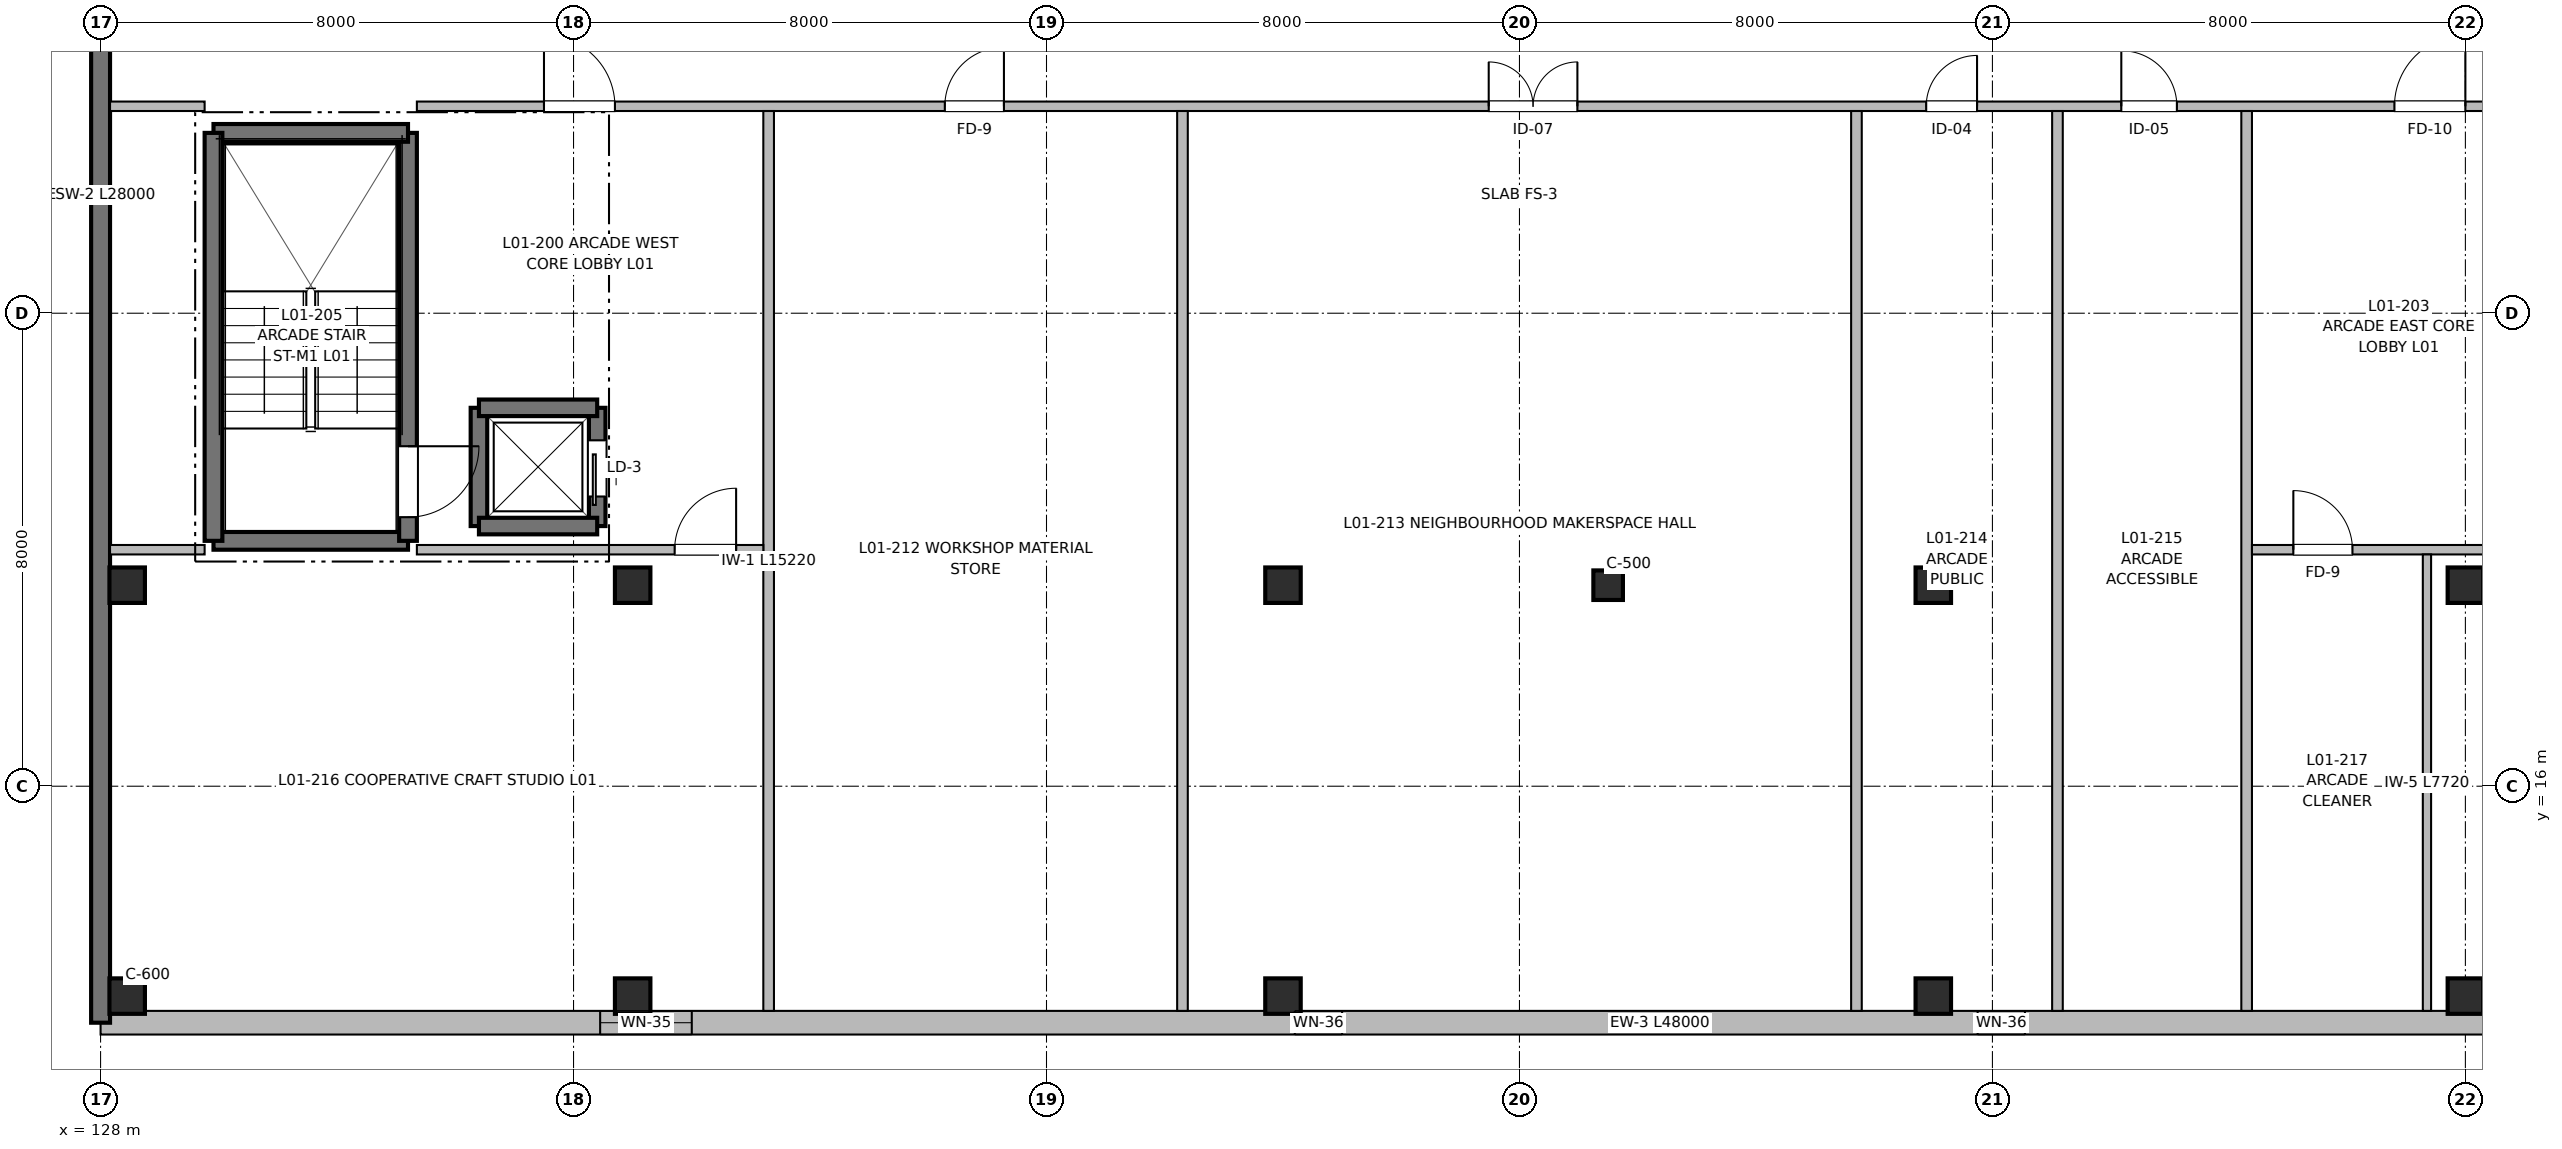
"""IFC4 building model, lengths in metres.
Left out: names, types, materials, properties, quantities, classifications, styles, units other than length and angle.
Written with IfcOpenShell. Run it as: python <this file> out.ifc"""

import sys

from ifc_helpers import new_model, si_unit, direction, frame, frame_2d, origin, origin_2d, place, context, subcontext, project, spatial, rectangle, extrude, element, fill, save


model = new_model("IFC4")
c1 = context("Model", 3, precision=1e-05, world=origin(), true_north=direction((0.0, 1.0)))
c2 = subcontext(c1, "Body", "Model", "MODEL_VIEW")
j1 = project(units=[si_unit("LENGTHUNIT", "METRE"), si_unit("PLANEANGLEUNIT", "RADIAN")], contexts=[c1])
p1 = place(None, origin())
s1 = spatial("IfcSite", under=j1, at=p1, CompositionType="ELEMENT")
p2 = place(p1, origin())
s2 = spatial("IfcBuilding", under=s1, at=p2, CompositionType="ELEMENT")
p3 = place(p2, frame((0.0, 0.0, 4.16)))
s3 = spatial("IfcBuildingStorey", under=s2, at=p3, CompositionType="ELEMENT", Elevation=4.16)
for number, where, z_axis, x_axis in (
    (1, (128.45, 12.45, 0.0), (0.0, 0.0, 1.0), (1.0, 0.0, 0.0)),
    (2, (128.45, 19.4, 0.0), (0.0, 0.0, 1.0), (1.0, 0.0, 0.0)),
    (3, (137.0, 12.45, 0.0), (0.0, 0.0, 1.0), (1.0, 0.0, 0.0)),
    (4, (137.0, 19.4, 0.0), (0.0, 0.0, 1.0), (1.0, 0.0, 0.0)),
    (5, (148.0, 12.45, 0.0), (0.0, 0.0, 1.0), (1.0, 0.0, 0.0)),
    (6, (148.0, 19.4, 0.0), (0.0, 0.0, 1.0), (1.0, 0.0, 0.0)),
):
    element("IfcColumn", number, at=place(p3, frame(where, z_axis=z_axis, x_axis=x_axis)), inside=s3, PredefinedType="COLUMN", context=c2, shape_type="SweptSolid", body=[
        extrude(rectangle(XDim=0.6, YDim=0.6, at=origin_2d()), origin(), (0.0, 0.0, 1.0), 3.2),
    ])
p4 = place(p3, frame((153.5, 19.4, 0.0), z_axis=(0.0, 0.0, 1.0), x_axis=(1.0, 0.0, 0.0)))
e7 = element("IfcColumn", 7, at=p4, inside=s3, PredefinedType="COLUMN", context=c2, shape_type="SweptSolid", body=[
    extrude(rectangle(XDim=0.5, YDim=0.5, at=origin_2d()), origin(), (0.0, 0.0, 1.0), 3.2),
])
for number, where, z_axis, x_axis in (
    (8, (159.0, 12.45, 0.0), (0.0, 0.0, 1.0), (1.0, 0.0, 0.0)),
    (9, (159.0, 19.4, 0.0), (0.0, 0.0, 1.0), (1.0, 0.0, 0.0)),
    (10, (168.0, 12.45, 0.0), (0.0, 0.0, 1.0), (1.0, 0.0, 0.0)),
    (11, (168.0, 19.4, 0.0), (0.0, 0.0, 1.0), (1.0, 0.0, 0.0)),
):
    element("IfcColumn", number, at=place(p3, frame(where, z_axis=z_axis, x_axis=x_axis)), inside=s3, PredefinedType="COLUMN", context=c2, shape_type="SweptSolid", body=[
        extrude(rectangle(XDim=0.6, YDim=0.6, at=origin_2d()), origin(), (0.0, 0.0, 1.0), 3.2),
    ])
p5 = place(p3, frame((176.0, 12.0, 0.0), z_axis=(0.0, 0.0, 1.0), x_axis=(-1.0, 0.0, 0.0)))
e12 = element("IfcWall", 12, at=p5, inside=s3, PredefinedType="SOLIDWALL", context=c2, shape_type="SweptSolid", body=[
    extrude(rectangle(XDim=48.0, YDim=0.4, at=frame_2d((24.0, 0.0))), origin(), (0.0, 0.0, 1.0), 2.94),
])
p6 = place(p5, frame((5.0, 0.0, 0.62)))
e13 = element("IfcOpeningElement", 13, at=p6, cuts=e12, PredefinedType="OPENING", context=c2, shape_type="SweptSolid", body=[
    extrude(rectangle(XDim=1.75, YDim=1.6, at=frame_2d((0.875, 0.8))), frame((0.0, 0.21, 0.0), z_axis=(0.0, -1.0, 0.0), x_axis=(1.0, 0.0, 0.0)), (0.0, 0.0, 1.0), 0.42),
])
p7 = place(p5, frame((15.45, 0.0, 1.52)))
e14 = element("IfcOpeningElement", 14, at=p7, cuts=e12, PredefinedType="OPENING", context=c2, shape_type="SweptSolid", body=[
    extrude(rectangle(XDim=0.8, YDim=0.7, at=frame_2d((0.4, 0.35))), frame((0.0, 0.21, 0.0), z_axis=(0.0, -1.0, 0.0), x_axis=(1.0, 0.0, 0.0)), (0.0, 0.0, 1.0), 0.42),
])
p8 = place(p5, frame((27.0, 0.0, 1.52)))
e15 = element("IfcOpeningElement", 15, at=p8, cuts=e12, PredefinedType="OPENING", context=c2, shape_type="SweptSolid", body=[
    extrude(rectangle(XDim=0.8, YDim=0.7, at=frame_2d((0.4, 0.35))), frame((0.0, 0.21, 0.0), z_axis=(0.0, -1.0, 0.0), x_axis=(1.0, 0.0, 0.0)), (0.0, 0.0, 1.0), 0.42),
])
p9 = place(p5, frame((38.0, 0.0, 0.45)))
e16 = element("IfcOpeningElement", 16, at=p9, cuts=e12, PredefinedType="OPENING", context=c2, shape_type="SweptSolid", body=[
    extrude(rectangle(XDim=1.55, YDim=1.85, at=frame_2d((0.775, 0.925))), frame((0.0, 0.21, 0.0), z_axis=(0.0, -1.0, 0.0), x_axis=(1.0, 0.0, 0.0)), (0.0, 0.0, 1.0), 0.42),
])
p10 = place(p3, frame((128.0, 12.0, 0.0), z_axis=(0.0, 0.0, 1.0), x_axis=(0.0, 1.0, 0.0)))
e17 = element("IfcWall", 17, at=p10, inside=s3, PredefinedType="SHEAR", context=c2, shape_type="SweptSolid", body=[
    extrude(rectangle(XDim=28.0, YDim=0.32, at=frame_2d((14.0, 0.0))), origin(), (0.0, 0.0, 1.0), 2.94),
])
p11 = place(p3, frame((136.4, 20.4, 0.0), z_axis=(0.0, 0.0, 1.0), x_axis=(0.0, 1.0, 0.0)))
e18 = element("IfcWall", 18, at=p11, inside=s3, PredefinedType="SHEAR", context=c2, shape_type="SweptSolid", body=[
    extrude(rectangle(XDim=2.0, YDim=0.28, at=frame_2d((1.0, 0.0))), origin(), (0.0, 0.0, 1.0), 2.94),
])
p12 = place(p11, frame((0.5, 0.0, 0.0)))
e19 = element("IfcOpeningElement", 19, at=p12, cuts=e18, PredefinedType="OPENING", context=c2, shape_type="SweptSolid", body=[
    extrude(rectangle(XDim=0.95, YDim=2.15, at=frame_2d((0.475, 1.075))), frame((0.0, 0.15, 0.0), z_axis=(0.0, -1.0, 0.0), x_axis=(1.0, 0.0, 0.0)), (0.0, 0.0, 1.0), 0.3),
])
for number, where, z_axis, x_axis in (
    (20, (134.4, 20.4, 0.0), (0.0, 0.0, 1.0), (0.0, 1.0, 0.0)),
    (21, (134.4, 20.4, 0.0), (0.0, 0.0, 1.0), (1.0, 0.0, 0.0)),
    (22, (134.4, 22.4, 0.0), (0.0, 0.0, 1.0), (1.0, 0.0, 0.0)),
):
    element("IfcWall", number, at=place(p3, frame(where, z_axis=z_axis, x_axis=x_axis)), inside=s3, PredefinedType="SHEAR", context=c2, shape_type="SweptSolid", body=[
        extrude(rectangle(XDim=2.0, YDim=0.28, at=frame_2d((1.0, 0.0))), origin(), (0.0, 0.0, 1.0), 2.94),
    ])
p13 = place(p3, frame((133.2, 20.15, 0.0), z_axis=(0.0, 0.0, 1.0), x_axis=(-1.0, 0.0, 0.0)))
e23 = element("IfcWall", 23, at=p13, inside=s3, PredefinedType="SHEAR", context=c2, shape_type="SweptSolid", body=[
    extrude(rectangle(XDim=3.29, YDim=0.3, at=frame_2d((1.645, 0.0))), origin(), (0.0, 0.0, 1.0), 3.2),
])
p14 = place(p3, frame((133.2, 27.05, 0.0), z_axis=(0.0, 0.0, 1.0), x_axis=(0.0, -1.0, 0.0)))
e24 = element("IfcWall", 24, at=p14, inside=s3, PredefinedType="SHEAR", context=c2, shape_type="SweptSolid", body=[
    extrude(rectangle(XDim=6.9, YDim=0.3, at=frame_2d((3.45, 0.0))), origin(), (0.0, 0.0, 1.0), 3.2),
])
p15 = place(p14, frame((5.3, 0.0, 0.0)))
e25 = element("IfcOpeningElement", 25, at=p15, cuts=e24, PredefinedType="OPENING", context=c2, shape_type="SweptSolid", body=[
    extrude(rectangle(XDim=1.2, YDim=2.2, at=frame_2d((0.6, 1.1))), frame((0.0, 0.16, 0.0), z_axis=(0.0, -1.0, 0.0), x_axis=(1.0, 0.0, 0.0)), (0.0, 0.0, 1.0), 0.32),
])
p16 = place(p3, frame((129.91, 27.05, 0.0), z_axis=(0.0, 0.0, 1.0), x_axis=(1.0, 0.0, 0.0)))
e26 = element("IfcWall", 26, at=p16, inside=s3, PredefinedType="SHEAR", context=c2, shape_type="SweptSolid", body=[
    extrude(rectangle(XDim=3.29, YDim=0.3, at=frame_2d((1.645, 0.0))), origin(), (0.0, 0.0, 1.0), 3.2),
])
p17 = place(p3, frame((129.91, 20.15, 0.0), z_axis=(0.0, 0.0, 1.0), x_axis=(0.0, 1.0, 0.0)))
e27 = element("IfcWall", 27, at=p17, inside=s3, PredefinedType="SHEAR", context=c2, shape_type="SweptSolid", body=[
    extrude(rectangle(XDim=6.9, YDim=0.3, at=frame_2d((3.45, 0.0))), origin(), (0.0, 0.0, 1.0), 3.2),
])
p18 = place(p3, frame((128.16, 27.5, 0.0), z_axis=(0.0, 0.0, 1.0), x_axis=(1.0, 0.0, 0.0)))
e28 = element("IfcWall", 28, at=p18, inside=s3, PredefinedType="PARTITIONING", context=c2, shape_type="SweptSolid", body=[
    extrude(rectangle(XDim=1.6, YDim=0.16, at=frame_2d((0.8, 0.0))), origin(), (0.0, 0.0, 1.0), 2.93),
])
p19 = place(p3, frame((133.35, 27.5, 0.0), z_axis=(0.0, 0.0, 1.0), x_axis=(1.0, 0.0, 0.0)))
e29 = element("IfcWall", 29, at=p19, inside=s3, PredefinedType="PARTITIONING", context=c2, shape_type="SweptSolid", body=[
    extrude(rectangle(XDim=36.01, YDim=0.16, at=frame_2d((18.005, 0.0))), origin(), (0.0, 0.0, 1.0), 2.93),
])
p20 = place(p19, frame((2.15, 0.0, 0.0)))
e30 = element("IfcOpeningElement", 30, at=p20, cuts=e29, PredefinedType="OPENING", context=c2, shape_type="SweptSolid", body=[
    extrude(rectangle(XDim=1.2, YDim=2.2, at=frame_2d((0.6, 1.1))), frame((0.0, 0.09, 0.0), z_axis=(0.0, -1.0, 0.0), x_axis=(1.0, 0.0, 0.0)), (0.0, 0.0, 1.0), 0.18),
])
p21 = place(p19, frame((33.45, 0.0, 0.0)))
e31 = element("IfcOpeningElement", 31, at=p21, cuts=e29, PredefinedType="OPENING", context=c2, shape_type="SweptSolid", body=[
    extrude(rectangle(XDim=1.2, YDim=2.2, at=frame_2d((0.6, 1.1))), frame((0.0, 0.09, 0.0), z_axis=(0.0, -1.0, 0.0), x_axis=(1.0, 0.0, 0.0)), (0.0, 0.0, 1.0), 0.18),
])
p22 = place(p19, frame((8.93, 0.0, 0.0)))
e32 = element("IfcOpeningElement", 32, at=p22, cuts=e29, PredefinedType="OPENING", context=c2, shape_type="SweptSolid", body=[
    extrude(rectangle(XDim=1.0, YDim=2.1, at=frame_2d((0.5, 1.05))), frame((0.0, 0.09, 0.0), z_axis=(0.0, -1.0, 0.0), x_axis=(1.0, 0.0, 0.0)), (0.0, 0.0, 1.0), 0.18),
])
p23 = place(p19, frame((18.13, 0.0, 0.0)))
e33 = element("IfcOpeningElement", 33, at=p23, cuts=e29, PredefinedType="OPENING", context=c2, shape_type="SweptSolid", body=[
    extrude(rectangle(XDim=1.5, YDim=2.2, at=frame_2d((0.75, 1.1))), frame((0.0, 0.09, 0.0), z_axis=(0.0, -1.0, 0.0), x_axis=(1.0, 0.0, 0.0)), (0.0, 0.0, 1.0), 0.18),
])
p24 = place(p19, frame((25.53, 0.0, 0.0)))
e34 = element("IfcOpeningElement", 34, at=p24, cuts=e29, PredefinedType="OPENING", context=c2, shape_type="SweptSolid", body=[
    extrude(rectangle(XDim=0.86, YDim=2.1, at=frame_2d((0.43, 1.05))), frame((0.0, 0.09, 0.0), z_axis=(0.0, -1.0, 0.0), x_axis=(1.0, 0.0, 0.0)), (0.0, 0.0, 1.0), 0.18),
])
p25 = place(p19, frame((28.83, 0.0, 0.0)))
e35 = element("IfcOpeningElement", 35, at=p25, cuts=e29, PredefinedType="OPENING", context=c2, shape_type="SweptSolid", body=[
    extrude(rectangle(XDim=0.94, YDim=2.1, at=frame_2d((0.47, 1.05))), frame((0.0, 0.09, 0.0), z_axis=(0.0, -1.0, 0.0), x_axis=(1.0, 0.0, 0.0)), (0.0, 0.0, 1.0), 0.18),
])
for number, where, z_axis, x_axis in (
    (36, (139.3, 12.2, 0.0), (0.0, 0.0, 1.0), (0.0, 1.0, 0.0)),
    (37, (164.3, 12.2, 0.0), (0.0, 0.0, 1.0), (0.0, 1.0, 0.0)),
    (38, (146.3, 12.2, 0.0), (0.0, 0.0, 1.0), (0.0, 1.0, 0.0)),
    (39, (157.7, 12.2, 0.0), (0.0, 0.0, 1.0), (0.0, 1.0, 0.0)),
    (40, (161.1, 12.2, 0.0), (0.0, 0.0, 1.0), (0.0, 1.0, 0.0)),
):
    element("IfcWall", number, at=place(p3, frame(where, z_axis=z_axis, x_axis=x_axis)), inside=s3, PredefinedType="PARTITIONING", context=c2, shape_type="SweptSolid", body=[
        extrude(rectangle(XDim=15.22, YDim=0.18, at=frame_2d((7.61, 0.0))), origin(), (0.0, 0.0, 1.0), 2.93),
    ])
p26 = place(p3, frame((128.16, 20.0, 0.0), z_axis=(0.0, 0.0, 1.0), x_axis=(1.0, 0.0, 0.0)))
e41 = element("IfcWall", 41, at=p26, inside=s3, PredefinedType="PARTITIONING", context=c2, shape_type="SweptSolid", body=[
    extrude(rectangle(XDim=1.6, YDim=0.16, at=frame_2d((0.8, 0.0))), origin(), (0.0, 0.0, 1.0), 2.93),
])
p27 = place(p3, frame((133.35, 20.0, 0.0), z_axis=(0.0, 0.0, 1.0), x_axis=(1.0, 0.0, 0.0)))
e42 = element("IfcWall", 42, at=p27, inside=s3, PredefinedType="PARTITIONING", context=c2, shape_type="SweptSolid", body=[
    extrude(rectangle(XDim=5.86, YDim=0.16, at=frame_2d((2.93, 0.0))), origin(), (0.0, 0.0, 1.0), 2.93),
])
p28 = place(p27, frame((4.36, 0.0, 0.0)))
e43 = element("IfcOpeningElement", 43, at=p28, cuts=e42, PredefinedType="OPENING", context=c2, shape_type="SweptSolid", body=[
    extrude(rectangle(XDim=1.04, YDim=2.15, at=frame_2d((0.52, 1.075))), frame((0.0, 0.09, 0.0), z_axis=(0.0, -1.0, 0.0), x_axis=(1.0, 0.0, 0.0)), (0.0, 0.0, 1.0), 0.18),
])
p29 = place(p3, frame((164.39, 20.0, 0.0), z_axis=(0.0, 0.0, 1.0), x_axis=(1.0, 0.0, 0.0)))
e44 = element("IfcWall", 44, at=p29, inside=s3, PredefinedType="PARTITIONING", context=c2, shape_type="SweptSolid", body=[
    extrude(rectangle(XDim=4.97, YDim=0.16, at=frame_2d((2.485, 0.0))), origin(), (0.0, 0.0, 1.0), 2.93),
])
p30 = place(p29, frame((0.7, 0.0, 0.0)))
e45 = element("IfcOpeningElement", 45, at=p30, cuts=e44, PredefinedType="OPENING", context=c2, shape_type="SweptSolid", body=[
    extrude(rectangle(XDim=1.0, YDim=2.1, at=frame_2d((0.5, 1.05))), frame((0.0, 0.09, 0.0), z_axis=(0.0, -1.0, 0.0), x_axis=(1.0, 0.0, 0.0)), (0.0, 0.0, 1.0), 0.18),
])
p31 = place(p3, frame((167.35, 12.2, 0.0), z_axis=(0.0, 0.0, 1.0), x_axis=(0.0, 1.0, 0.0)))
e46 = element("IfcWall", 46, at=p31, inside=s3, PredefinedType="PARTITIONING", context=c2, shape_type="SweptSolid", body=[
    extrude(rectangle(XDim=7.72, YDim=0.14, at=frame_2d((3.86, 0.0))), origin(), (0.0, 0.0, 1.0), 2.93),
])
p32 = place(p12, origin())
e47 = element("IfcDoor", 47, at=p32, inside=s3, OperationType="SLIDING_TO_LEFT", PredefinedType="DOOR", context=c2, shape_type="SweptSolid", body=[
    extrude(rectangle(XDim=0.95, YDim=2.15, at=frame_2d((0.475, 1.075))), frame((0.0, 0.025, 0.0), z_axis=(0.0, -1.0, 0.0), x_axis=(1.0, 0.0, 0.0)), (0.0, 0.0, 1.0), 0.05),
])
fill(e19, e47)
p33 = place(p7, origin())
e48 = element("IfcWindow", 48, at=p33, inside=s3, PartitioningType="SINGLE_PANEL", PredefinedType="WINDOW", context=c2, shape_type="SweptSolid", body=[
    extrude(rectangle(XDim=0.8, YDim=0.7, at=frame_2d((0.4, 0.35))), frame((0.0, 0.03, 0.0), z_axis=(0.0, -1.0, 0.0), x_axis=(1.0, 0.0, 0.0)), (0.0, 0.0, 1.0), 0.06),
])
fill(e14, e48)
p34 = place(p8, origin())
e49 = element("IfcWindow", 49, at=p34, inside=s3, PartitioningType="SINGLE_PANEL", PredefinedType="WINDOW", context=c2, shape_type="SweptSolid", body=[
    extrude(rectangle(XDim=0.8, YDim=0.7, at=frame_2d((0.4, 0.35))), frame((0.0, 0.03, 0.0), z_axis=(0.0, -1.0, 0.0), x_axis=(1.0, 0.0, 0.0)), (0.0, 0.0, 1.0), 0.06),
])
fill(e15, e49)
p35 = place(p9, origin())
e50 = element("IfcWindow", 50, at=p35, inside=s3, PartitioningType="SINGLE_PANEL", PredefinedType="WINDOW", context=c2, shape_type="SweptSolid", body=[
    extrude(rectangle(XDim=1.55, YDim=1.85, at=frame_2d((0.775, 0.925))), frame((0.0, 0.03, 0.0), z_axis=(0.0, -1.0, 0.0), x_axis=(1.0, 0.0, 0.0)), (0.0, 0.0, 1.0), 0.06),
])
fill(e16, e50)
p36 = place(p15, origin())
e51 = element("IfcDoor", 51, at=p36, inside=s3, OperationType="SINGLE_SWING_LEFT", PredefinedType="DOOR", context=c2, shape_type="SweptSolid", body=[
    extrude(rectangle(XDim=1.2, YDim=2.2, at=frame_2d((0.6, 1.1))), frame((0.0, 0.025, 0.0), z_axis=(0.0, -1.0, 0.0), x_axis=(1.0, 0.0, 0.0)), (0.0, 0.0, 1.0), 0.05),
])
fill(e25, e51)
p37 = place(p20, origin())
e52 = element("IfcDoor", 52, at=p37, inside=s3, OperationType="SINGLE_SWING_LEFT", PredefinedType="DOOR", context=c2, shape_type="SweptSolid", body=[
    extrude(rectangle(XDim=1.2, YDim=2.2, at=frame_2d((0.6, 1.1))), frame((0.0, 0.025, 0.0), z_axis=(0.0, -1.0, 0.0), x_axis=(1.0, 0.0, 0.0)), (0.0, 0.0, 1.0), 0.05),
])
fill(e30, e52)
p38 = place(p21, origin())
e53 = element("IfcDoor", 53, at=p38, inside=s3, OperationType="SINGLE_SWING_RIGHT", PredefinedType="DOOR", context=c2, shape_type="SweptSolid", body=[
    extrude(rectangle(XDim=1.2, YDim=2.2, at=frame_2d((0.6, 1.1))), frame((0.0, 0.025, 0.0), z_axis=(0.0, -1.0, 0.0), x_axis=(1.0, 0.0, 0.0)), (0.0, 0.0, 1.0), 0.05),
])
fill(e31, e53)
p39 = place(p22, origin())
e54 = element("IfcDoor", 54, at=p39, inside=s3, OperationType="SINGLE_SWING_RIGHT", PredefinedType="DOOR", context=c2, shape_type="SweptSolid", body=[
    extrude(rectangle(XDim=1.0, YDim=2.1, at=frame_2d((0.5, 1.05))), frame((0.0, 0.025, 0.0), z_axis=(0.0, -1.0, 0.0), x_axis=(1.0, 0.0, 0.0)), (0.0, 0.0, 1.0), 0.05),
])
fill(e32, e54)
p40 = place(p23, origin())
e55 = element("IfcDoor", 55, at=p40, inside=s3, OperationType="DOUBLE_DOOR_SINGLE_SWING", PredefinedType="DOOR", context=c2, shape_type="SweptSolid", body=[
    extrude(rectangle(XDim=1.5, YDim=2.2, at=frame_2d((0.75, 1.1))), frame((0.0, 0.025, 0.0), z_axis=(0.0, -1.0, 0.0), x_axis=(1.0, 0.0, 0.0)), (0.0, 0.0, 1.0), 0.05),
])
fill(e33, e55)
p41 = place(p24, origin())
e56 = element("IfcDoor", 56, at=p41, inside=s3, OperationType="SINGLE_SWING_RIGHT", PredefinedType="DOOR", context=c2, shape_type="SweptSolid", body=[
    extrude(rectangle(XDim=0.86, YDim=2.1, at=frame_2d((0.43, 1.05))), frame((0.0, 0.025, 0.0), z_axis=(0.0, -1.0, 0.0), x_axis=(1.0, 0.0, 0.0)), (0.0, 0.0, 1.0), 0.05),
])
fill(e34, e56)
p42 = place(p25, origin())
e57 = element("IfcDoor", 57, at=p42, inside=s3, OperationType="SINGLE_SWING_LEFT", PredefinedType="DOOR", context=c2, shape_type="SweptSolid", body=[
    extrude(rectangle(XDim=0.94, YDim=2.1, at=frame_2d((0.47, 1.05))), frame((0.0, 0.025, 0.0), z_axis=(0.0, -1.0, 0.0), x_axis=(1.0, 0.0, 0.0)), (0.0, 0.0, 1.0), 0.05),
])
fill(e35, e57)
p43 = place(p28, origin())
e58 = element("IfcDoor", 58, at=p43, inside=s3, OperationType="SINGLE_SWING_RIGHT", PredefinedType="DOOR", context=c2, shape_type="SweptSolid", body=[
    extrude(rectangle(XDim=1.04, YDim=2.15, at=frame_2d((0.52, 1.075))), frame((0.0, 0.025, 0.0), z_axis=(0.0, -1.0, 0.0), x_axis=(1.0, 0.0, 0.0)), (0.0, 0.0, 1.0), 0.05),
])
fill(e43, e58)
p44 = place(p30, origin())
e59 = element("IfcDoor", 59, at=p44, inside=s3, OperationType="SINGLE_SWING_LEFT", PredefinedType="DOOR", context=c2, shape_type="SweptSolid", body=[
    extrude(rectangle(XDim=1.0, YDim=2.1, at=frame_2d((0.5, 1.05))), frame((0.0, 0.025, 0.0), z_axis=(0.0, -1.0, 0.0), x_axis=(1.0, 0.0, 0.0)), (0.0, 0.0, 1.0), 0.05),
])
fill(e45, e59)
save(model, sys.argv[1])
